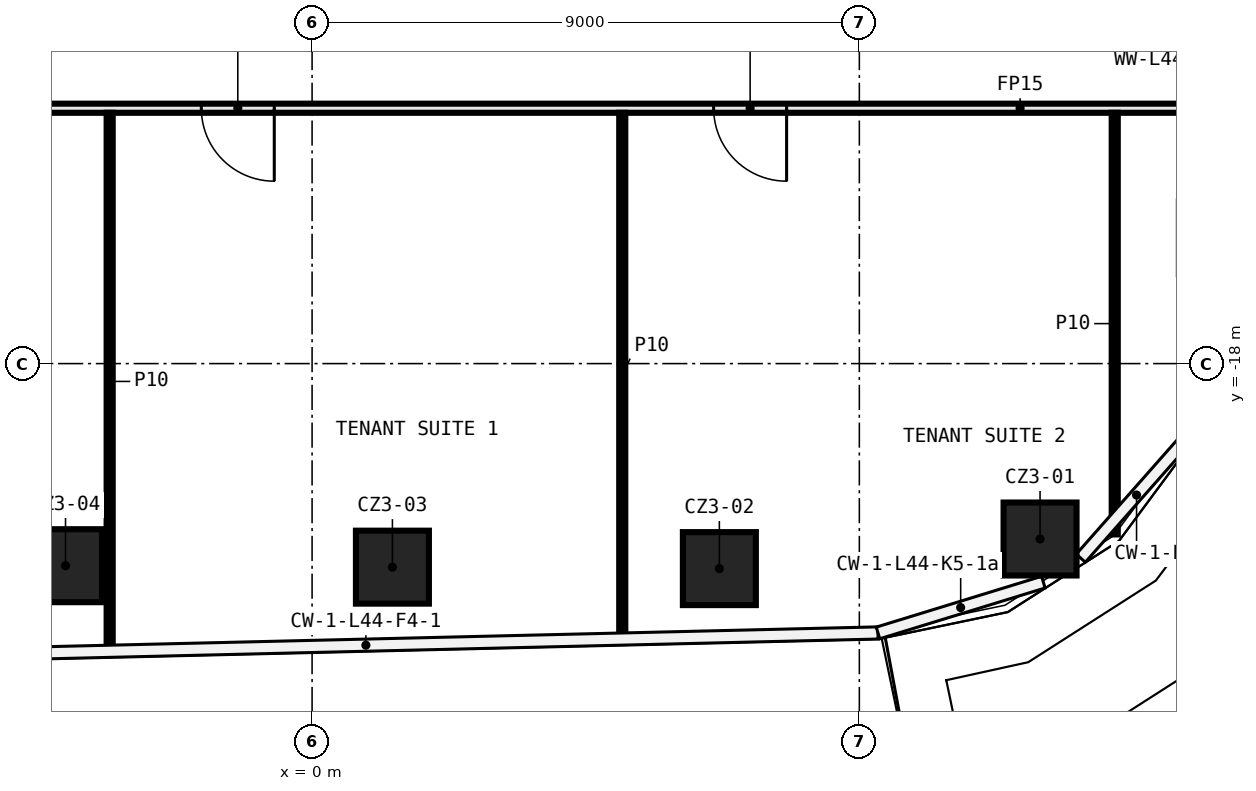
"""IFC4 building model, lengths in metres.
Left out: names, types, materials, properties, quantities, classifications, styles, units other than length and angle.
Written with IfcOpenShell. Run it as: python <this file> out.ifc"""

import sys

from ifc_helpers import new_model, si_unit, direction, frame, frame_2d, origin, origin_2d, place, context, subcontext, project, spatial, rectangle, extrude, element, fill, save


model = new_model("IFC4")
c1 = context("Model", 3, precision=1e-05, world=origin(), true_north=direction((0.0, 1.0)))
c2 = subcontext(c1, "Body", "Model", "MODEL_VIEW")
j1 = project(units=[si_unit("LENGTHUNIT", "METRE"), si_unit("PLANEANGLEUNIT", "RADIAN")], contexts=[c1])
p1 = place(None, origin())
s1 = spatial("IfcSite", under=j1, at=p1, CompositionType="ELEMENT")
p2 = place(p1, origin())
s2 = spatial("IfcBuilding", under=s1, at=p2, CompositionType="ELEMENT")
p3 = place(p2, frame((0.0, 0.0, 211.4)))
s3 = spatial("IfcBuildingStorey", under=s2, at=p3, CompositionType="ELEMENT", Elevation=211.4)
for number, where, z_axis, x_axis in (
    (1, (11.972, -20.885, 0.0), (0.0, 0.0, 1.0), (1.0, 0.0, 0.0)),
    (2, (6.698, -21.372, 0.0), (0.0, 0.0, 1.0), (1.0, 0.0, 0.0)),
    (3, (1.321, -21.348, 0.0), (0.0, 0.0, 1.0), (1.0, 0.0, 0.0)),
    (4, (-4.055, -21.324, 0.0), (0.0, 0.0, 1.0), (1.0, 0.0, 0.0)),
):
    element("IfcColumn", number, at=place(p3, frame(where, z_axis=z_axis, x_axis=x_axis)), inside=s3, PredefinedType="COLUMN", context=c2, shape_type="SweptSolid", body=[
        extrude(rectangle(XDim=1.2, YDim=1.2, at=origin_2d()), origin(), (0.0, 0.0, 1.0), 3.82),
    ])
p4 = place(p3, frame((15.283, -13.8, 0.0), z_axis=(0.0, 0.0, 1.0), x_axis=(-1.0, 0.0, 0.0)))
e5 = element("IfcWall", 5, at=p4, inside=s3, PredefinedType="PARTITIONING", context=c2, shape_type="SweptSolid", body=[
    extrude(rectangle(XDim=27.358, YDim=0.15, at=frame_2d((13.679, 0.0))), origin(), (0.0, 0.0, 1.0), 3.82),
])
p5 = place(p4, frame((20.117, 0.0, 0.0)))
e6 = element("IfcOpeningElement", 6, at=p5, cuts=e5, PredefinedType="OPENING", context=c2, shape_type="SweptSolid", body=[
    extrude(rectangle(XDim=1.2, YDim=2.1, at=frame_2d((0.6, 1.05))), frame((0.0, 0.085, 0.0), z_axis=(0.0, -1.0, 0.0), x_axis=(1.0, 0.0, 0.0)), (0.0, 0.0, 1.0), 0.17),
])
p6 = place(p4, frame((15.905, 0.0, 0.0)))
e7 = element("IfcOpeningElement", 7, at=p6, cuts=e5, PredefinedType="OPENING", context=c2, shape_type="SweptSolid", body=[
    extrude(rectangle(XDim=1.2, YDim=2.1, at=frame_2d((0.6, 1.05))), frame((0.0, 0.085, 0.0), z_axis=(0.0, -1.0, 0.0), x_axis=(1.0, 0.0, 0.0)), (0.0, 0.0, 1.0), 0.17),
])
p7 = place(p4, frame((7.48, 0.0, 0.0)))
e8 = element("IfcOpeningElement", 8, at=p7, cuts=e5, PredefinedType="OPENING", context=c2, shape_type="SweptSolid", body=[
    extrude(rectangle(XDim=1.2, YDim=2.1, at=frame_2d((0.6, 1.05))), frame((0.0, 0.085, 0.0), z_axis=(0.0, -1.0, 0.0), x_axis=(1.0, 0.0, 0.0)), (0.0, 0.0, 1.0), 0.17),
])
p8 = place(p3, frame((13.2, -20.81, 0.0), z_axis=(0.0, 0.0, 1.0), x_axis=(0.0, 1.0, 0.0)))
e9 = element("IfcWall", 9, at=p8, inside=s3, PredefinedType="PARTITIONING", context=c2, shape_type="SweptSolid", body=[
    extrude(rectangle(XDim=6.935, YDim=0.1, at=frame_2d((3.467, 0.0))), origin(), (0.0, 0.0, 1.0), 3.82),
])
p9 = place(p3, frame((5.101, -22.51, 0.0), z_axis=(0.0, 0.0, 1.0), x_axis=(0.0, 1.0, 0.0)))
e10 = element("IfcWall", 10, at=p9, inside=s3, PredefinedType="PARTITIONING", context=c2, shape_type="SweptSolid", body=[
    extrude(rectangle(XDim=8.635, YDim=0.1, at=frame_2d((4.318, 0.0))), origin(), (0.0, 0.0, 1.0), 3.82),
])
p10 = place(p3, frame((-3.329, -22.711, 0.0), z_axis=(0.0, 0.0, 1.0), x_axis=(0.0, 1.0, 0.0)))
e11 = element("IfcWall", 11, at=p10, inside=s3, PredefinedType="PARTITIONING", context=c2, shape_type="SweptSolid", body=[
    extrude(rectangle(XDim=8.836, YDim=0.1, at=frame_2d((4.418, 0.0))), origin(), (0.0, 0.0, 1.0), 3.82),
])
p11 = place(p6, origin())
e12 = element("IfcDoor", 12, at=p11, inside=s3, OperationType="SINGLE_SWING_LEFT", PredefinedType="DOOR", context=c2, shape_type="SweptSolid", body=[
    extrude(rectangle(XDim=1.2, YDim=2.1, at=frame_2d((0.6, 1.05))), frame((0.0, 0.025, 0.0), z_axis=(0.0, -1.0, 0.0), x_axis=(1.0, 0.0, 0.0)), (0.0, 0.0, 1.0), 0.05),
])
fill(e7, e12)
p12 = place(p7, origin())
e13 = element("IfcDoor", 13, at=p12, inside=s3, OperationType="SINGLE_SWING_RIGHT", PredefinedType="DOOR", context=c2, shape_type="SweptSolid", body=[
    extrude(rectangle(XDim=1.2, YDim=2.1, at=frame_2d((0.6, 1.05))), frame((0.0, 0.025, 0.0), z_axis=(0.0, -1.0, 0.0), x_axis=(1.0, 0.0, 0.0)), (0.0, 0.0, 1.0), 0.05),
])
fill(e8, e13)
save(model, sys.argv[1])
